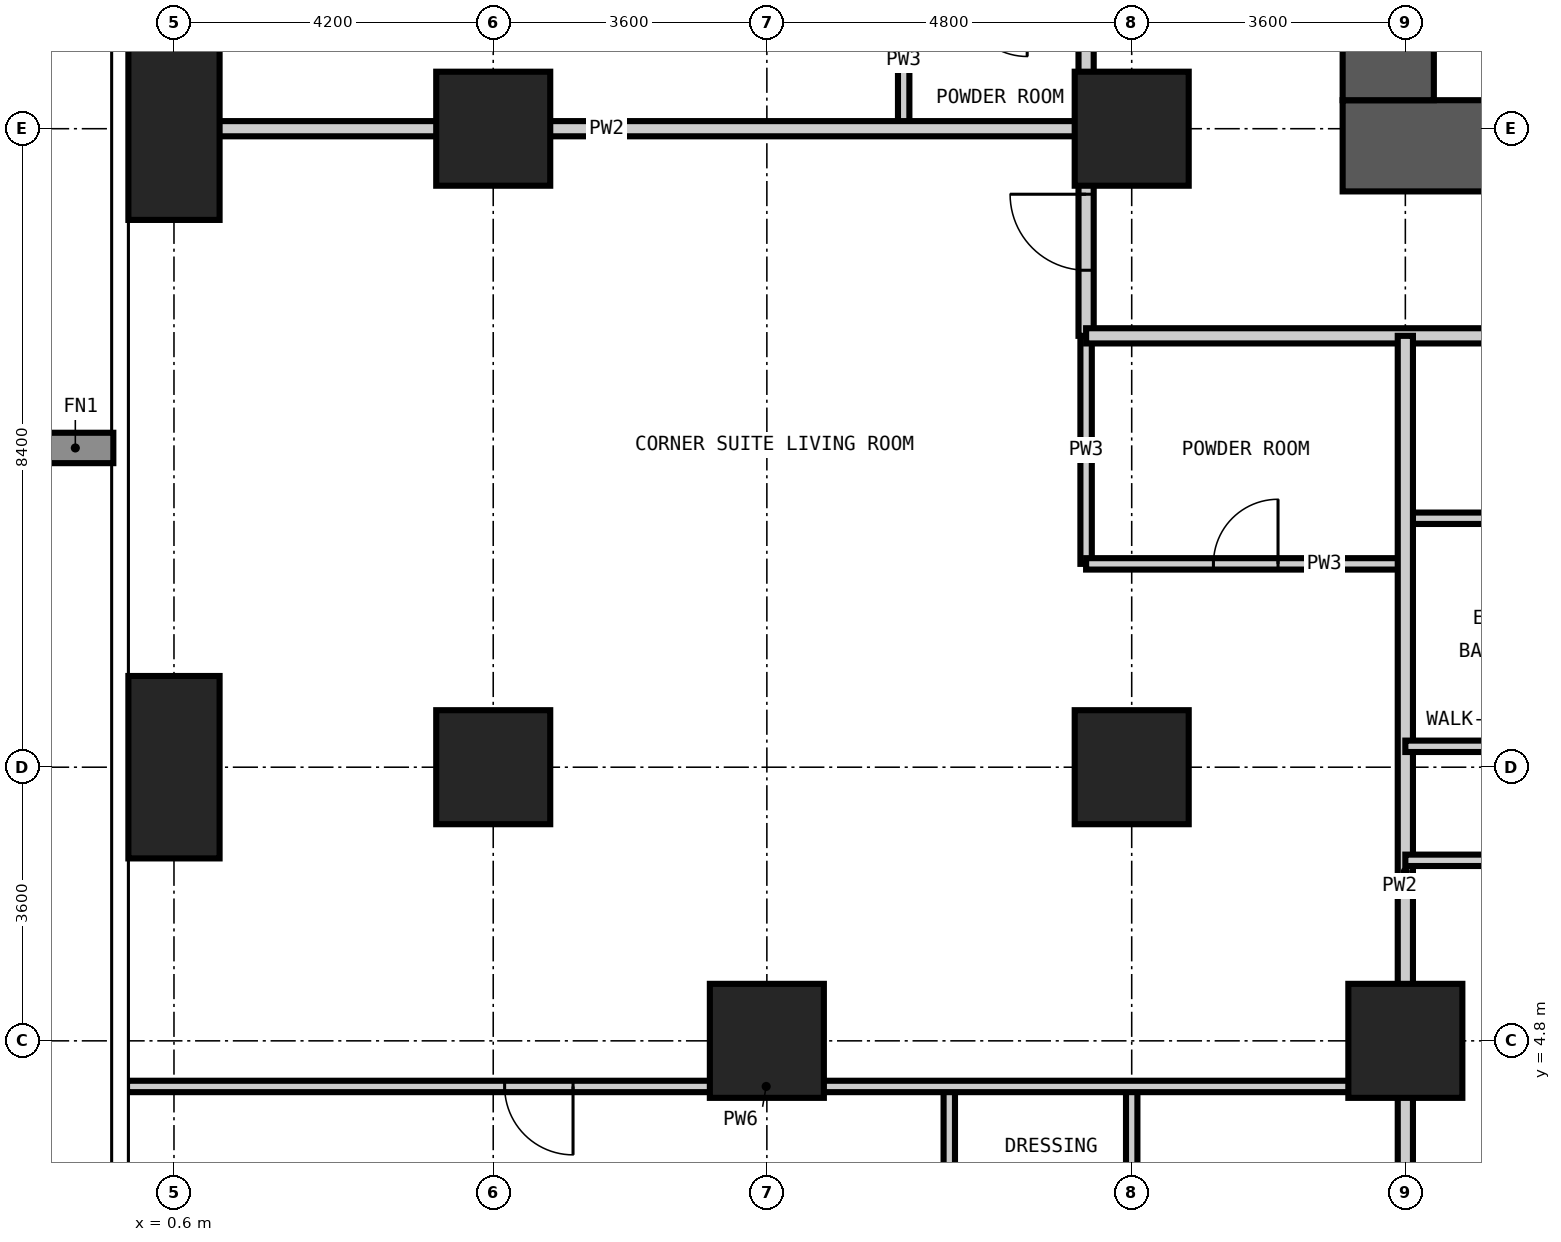
"""IFC4 building model, lengths in metres.
Left out: names, types, materials, properties, quantities, classifications, styles, units other than length and angle.
Written with IfcOpenShell. Run it as: python <this file> out.ifc"""

import sys

from ifc_helpers import new_model, si_unit, direction, frame, frame_2d, origin, origin_2d, place, context, subcontext, project, spatial, rectangle, extrude, element, fill, save


model = new_model("IFC4")
c1 = context("Model", 3, precision=1e-05, world=origin(), true_north=direction((0.0, 1.0)))
c2 = subcontext(c1, "Body", "Model", "MODEL_VIEW")
j1 = project(units=[si_unit("LENGTHUNIT", "METRE"), si_unit("PLANEANGLEUNIT", "RADIAN")], contexts=[c1])
p1 = place(None, origin())
s1 = spatial("IfcSite", under=j1, at=p1, CompositionType="ELEMENT")
p2 = place(p1, origin())
s2 = spatial("IfcBuilding", under=s1, at=p2, CompositionType="ELEMENT")
p3 = place(p2, frame((0.0, 0.0, 100.8)))
s3 = spatial("IfcBuildingStorey", under=s2, at=p3, CompositionType="ELEMENT", Elevation=100.8)
for number, where, z_axis, x_axis in (
    (1, (0.6, 8.4, -0.35), (0.0, 0.0, 1.0), (1.0, 0.0, 0.0)),
    (2, (0.6, 16.8, -0.35), (0.0, 0.0, 1.0), (1.0, 0.0, 0.0)),
):
    element("IfcColumn", number, at=place(p3, frame(where, z_axis=z_axis, x_axis=x_axis)), inside=s3, PredefinedType="COLUMN", context=c2, shape_type="SweptSolid", body=[
        extrude(rectangle(XDim=1.2, YDim=2.4, at=origin_2d()), origin(), (0.0, 0.0, 1.0), 3.6),
    ])
for number, where, z_axis, x_axis in (
    (3, (4.8, 8.4, -0.35), (0.0, 0.0, 1.0), (1.0, 0.0, 0.0)),
    (4, (4.8, 16.8, -0.35), (0.0, 0.0, 1.0), (1.0, 0.0, 0.0)),
    (5, (8.4, 4.8, -0.35), (0.0, 0.0, 1.0), (1.0, 0.0, 0.0)),
    (6, (13.2, 8.4, -0.35), (0.0, 0.0, 1.0), (1.0, 0.0, 0.0)),
    (7, (13.2, 16.8, -0.35), (0.0, 0.0, 1.0), (1.0, 0.0, 0.0)),
    (8, (16.8, 4.8, -0.35), (0.0, 0.0, 1.0), (1.0, 0.0, 0.0)),
):
    element("IfcColumn", number, at=place(p3, frame(where, z_axis=z_axis, x_axis=x_axis)), inside=s3, PredefinedType="COLUMN", context=c2, shape_type="SweptSolid", body=[
        extrude(rectangle(XDim=1.5, YDim=1.5, at=origin_2d()), origin(), (0.0, 0.0, 1.0), 3.6),
    ])
p4 = place(p3, frame((15.975, 16.575, -0.35), z_axis=(0.0, 0.0, 1.0), x_axis=(1.0, 0.0, 0.0)))
e9 = element("IfcWall", 9, at=p4, inside=s3, PredefinedType="SHEAR", context=c2, shape_type="SweptSolid", body=[
    extrude(rectangle(XDim=26.85, YDim=1.2, at=frame_2d((13.425, 0.0))), origin(), (0.0, 0.0, 1.0), 3.6),
])
p5 = place(p4, frame((12.925, 0.0, 0.35)))
e10 = element("IfcOpeningElement", 10, at=p5, cuts=e9, PredefinedType="OPENING", context=c2, shape_type="SweptSolid", body=[
    extrude(rectangle(XDim=1.0, YDim=2.1, at=frame_2d((0.5, 1.05))), frame((0.0, 0.61, 0.0), z_axis=(0.0, -1.0, 0.0), x_axis=(1.0, 0.0, 0.0)), (0.0, 0.0, 1.0), 1.22),
])
p6 = place(p4, frame((19.225, 0.0, 0.35)))
e11 = element("IfcOpeningElement", 11, at=p6, cuts=e9, PredefinedType="OPENING", context=c2, shape_type="SweptSolid", body=[
    extrude(rectangle(XDim=1.0, YDim=2.1, at=frame_2d((0.5, 1.05))), frame((0.0, 0.61, 0.0), z_axis=(0.0, -1.0, 0.0), x_axis=(1.0, 0.0, 0.0)), (0.0, 0.0, 1.0), 1.22),
])
p7 = place(p3, frame((16.575, 41.625, -0.35), z_axis=(0.0, 0.0, 1.0), x_axis=(0.0, -1.0, 0.0)))
e12 = element("IfcWall", 12, at=p7, inside=s3, PredefinedType="SHEAR", context=c2, shape_type="SweptSolid", body=[
    extrude(rectangle(XDim=24.45, YDim=1.2, at=frame_2d((12.225, 0.0))), origin(), (0.0, 0.0, 1.0), 3.6),
])
p8 = place(p7, frame((11.325, 0.0, 0.35)))
e13 = element("IfcOpeningElement", 13, at=p8, cuts=e12, PredefinedType="OPENING", context=c2, shape_type="SweptSolid", body=[
    extrude(rectangle(XDim=1.8, YDim=2.2, at=frame_2d((0.9, 1.1))), frame((0.0, 0.61, 0.0), z_axis=(0.0, -1.0, 0.0), x_axis=(1.0, 0.0, 0.0)), (0.0, 0.0, 1.0), 1.22),
])
p9 = place(p7, frame((20.125, 0.0, 0.35)))
e14 = element("IfcOpeningElement", 14, at=p9, cuts=e12, PredefinedType="OPENING", context=c2, shape_type="SweptSolid", body=[
    extrude(rectangle(XDim=1.0, YDim=2.1, at=frame_2d((0.5, 1.05))), frame((0.0, 0.61, 0.0), z_axis=(0.0, -1.0, 0.0), x_axis=(1.0, 0.0, 0.0)), (0.0, 0.0, 1.0), 1.22),
])
p10 = place(p7, frame((5.425, 0.0, 0.35)))
e15 = element("IfcOpeningElement", 15, at=p10, cuts=e12, PredefinedType="OPENING", context=c2, shape_type="SweptSolid", body=[
    extrude(rectangle(XDim=1.0, YDim=2.1, at=frame_2d((0.5, 1.05))), frame((0.0, 0.61, 0.0), z_axis=(0.0, -1.0, 0.0), x_axis=(1.0, 0.0, 0.0)), (0.0, 0.0, 1.0), 1.22),
])
p11 = place(p3, frame((10.2, 16.8, 0.0), z_axis=(0.0, 0.0, 1.0), x_axis=(0.0, 1.0, 0.0)))
e16 = element("IfcWall", 16, at=p11, inside=s3, PredefinedType="PARTITIONING", context=c2, shape_type="SweptSolid", body=[
    extrude(rectangle(XDim=1.8, YDim=0.15, at=frame_2d((0.9, 0.0))), origin(), (0.0, 0.0, 1.0), 3.25),
])
p12 = place(p3, frame((12.6, 11.075, 0.0), z_axis=(0.0, 0.0, 1.0), x_axis=(0.0, 1.0, 0.0)))
e17 = element("IfcWall", 17, at=p12, inside=s3, PredefinedType="PARTITIONING", context=c2, shape_type="SweptSolid", body=[
    extrude(rectangle(XDim=3.0, YDim=0.15, at=frame_2d((1.5, 0.0))), origin(), (0.0, 0.0, 1.0), 3.25),
])
p13 = place(p3, frame((12.6, 11.075, 0.0), z_axis=(0.0, 0.0, 1.0), x_axis=(1.0, 0.0, 0.0)))
e18 = element("IfcWall", 18, at=p13, inside=s3, PredefinedType="PARTITIONING", context=c2, shape_type="SweptSolid", body=[
    extrude(rectangle(XDim=4.2, YDim=0.15, at=frame_2d((2.1, 0.0))), origin(), (0.0, 0.0, 1.0), 3.25),
])
p14 = place(p13, frame((1.675, 0.0, 0.0)))
e19 = element("IfcOpeningElement", 19, at=p14, cuts=e18, PredefinedType="OPENING", context=c2, shape_type="SweptSolid", body=[
    extrude(rectangle(XDim=0.85, YDim=2.1, at=frame_2d((0.425, 1.05))), frame((0.0, 0.085, 0.0), z_axis=(0.0, -1.0, 0.0), x_axis=(1.0, 0.0, 0.0)), (0.0, 0.0, 1.0), 0.17),
])
p15 = place(p3, frame((16.8, 11.675, 0.0), z_axis=(0.0, 0.0, 1.0), x_axis=(1.0, 0.0, 0.0)))
e20 = element("IfcWall", 20, at=p15, inside=s3, PredefinedType="PARTITIONING", context=c2, shape_type="SweptSolid", body=[
    extrude(rectangle(XDim=3.0, YDim=0.15, at=frame_2d((1.5, 0.0))), origin(), (0.0, 0.0, 1.0), 3.25),
])
p16 = place(p3, frame((12.6, 14.075, 0.0), z_axis=(0.0, 0.0, 1.0), x_axis=(0.0, 1.0, 0.0)))
e21 = element("IfcWall", 21, at=p16, inside=s3, PredefinedType="PARTITIONING", context=c2, shape_type="SweptSolid", body=[
    extrude(rectangle(XDim=31.25, YDim=0.2, at=frame_2d((15.625, 0.0))), origin(), (0.0, 0.0, 1.0), 3.25),
])
p17 = place(p16, frame((5.225, 0.0, 0.0)))
e22 = element("IfcOpeningElement", 22, at=p17, cuts=e21, PredefinedType="OPENING", context=c2, shape_type="SweptSolid", body=[
    extrude(rectangle(XDim=1.0, YDim=2.2, at=frame_2d((0.5, 1.1))), frame((0.0, 0.11, 0.0), z_axis=(0.0, -1.0, 0.0), x_axis=(1.0, 0.0, 0.0)), (0.0, 0.0, 1.0), 0.22),
])
p18 = place(p16, frame((13.625, 0.0, 0.0)))
e23 = element("IfcOpeningElement", 23, at=p18, cuts=e21, PredefinedType="OPENING", context=c2, shape_type="SweptSolid", body=[
    extrude(rectangle(XDim=1.0, YDim=2.2, at=frame_2d((0.5, 1.1))), frame((0.0, 0.11, 0.0), z_axis=(0.0, -1.0, 0.0), x_axis=(1.0, 0.0, 0.0)), (0.0, 0.0, 1.0), 0.22),
])
p19 = place(p16, frame((22.025, 0.0, 0.0)))
e24 = element("IfcOpeningElement", 24, at=p19, cuts=e21, PredefinedType="OPENING", context=c2, shape_type="SweptSolid", body=[
    extrude(rectangle(XDim=1.0, YDim=2.2, at=frame_2d((0.5, 1.1))), frame((0.0, 0.11, 0.0), z_axis=(0.0, -1.0, 0.0), x_axis=(1.0, 0.0, 0.0)), (0.0, 0.0, 1.0), 0.22),
])
p20 = place(p16, frame((0.863, 0.0, 0.0)))
e25 = element("IfcOpeningElement", 25, at=p20, cuts=e21, PredefinedType="OPENING", context=c2, shape_type="SweptSolid", body=[
    extrude(rectangle(XDim=1.0, YDim=2.2, at=frame_2d((0.5, 1.1))), frame((0.0, 0.11, 0.0), z_axis=(0.0, -1.0, 0.0), x_axis=(1.0, 0.0, 0.0)), (0.0, 0.0, 1.0), 0.22),
])
p21 = place(p16, frame((29.088, 0.0, 0.0)))
e26 = element("IfcOpeningElement", 26, at=p21, cuts=e21, PredefinedType="OPENING", context=c2, shape_type="SweptSolid", body=[
    extrude(rectangle(XDim=1.0, YDim=2.2, at=frame_2d((0.5, 1.1))), frame((0.0, 0.11, 0.0), z_axis=(0.0, -1.0, 0.0), x_axis=(1.0, 0.0, 0.0)), (0.0, 0.0, 1.0), 0.22),
])
p22 = place(p3, frame((45.925, 14.075, 0.0), z_axis=(0.0, 0.0, 1.0), x_axis=(-1.0, 0.0, 0.0)))
e27 = element("IfcWall", 27, at=p22, inside=s3, PredefinedType="PARTITIONING", context=c2, shape_type="SweptSolid", body=[
    extrude(rectangle(XDim=33.325, YDim=0.2, at=frame_2d((16.663, 0.0))), origin(), (0.0, 0.0, 1.0), 3.25),
])
p23 = place(p22, frame((26.525, 0.0, 0.0)))
e28 = element("IfcOpeningElement", 28, at=p23, cuts=e27, PredefinedType="OPENING", context=c2, shape_type="SweptSolid", body=[
    extrude(rectangle(XDim=1.0, YDim=2.2, at=frame_2d((0.5, 1.1))), frame((0.0, 0.11, 0.0), z_axis=(0.0, -1.0, 0.0), x_axis=(1.0, 0.0, 0.0)), (0.0, 0.0, 1.0), 0.22),
])
p24 = place(p22, frame((20.225, 0.0, 0.0)))
e29 = element("IfcOpeningElement", 29, at=p24, cuts=e27, PredefinedType="OPENING", context=c2, shape_type="SweptSolid", body=[
    extrude(rectangle(XDim=1.0, YDim=2.2, at=frame_2d((0.5, 1.1))), frame((0.0, 0.11, 0.0), z_axis=(0.0, -1.0, 0.0), x_axis=(1.0, 0.0, 0.0)), (0.0, 0.0, 1.0), 0.22),
])
p25 = place(p22, frame((11.825, 0.0, 0.0)))
e30 = element("IfcOpeningElement", 30, at=p25, cuts=e27, PredefinedType="OPENING", context=c2, shape_type="SweptSolid", body=[
    extrude(rectangle(XDim=1.0, YDim=2.2, at=frame_2d((0.5, 1.1))), frame((0.0, 0.11, 0.0), z_axis=(0.0, -1.0, 0.0), x_axis=(1.0, 0.0, 0.0)), (0.0, 0.0, 1.0), 0.22),
])
p26 = place(p22, frame((5.525, 0.0, 0.0)))
e31 = element("IfcOpeningElement", 31, at=p26, cuts=e27, PredefinedType="OPENING", context=c2, shape_type="SweptSolid", body=[
    extrude(rectangle(XDim=1.0, YDim=2.2, at=frame_2d((0.5, 1.1))), frame((0.0, 0.11, 0.0), z_axis=(0.0, -1.0, 0.0), x_axis=(1.0, 0.0, 0.0)), (0.0, 0.0, 1.0), 0.22),
])
p27 = place(p3, frame((16.8, -0.018, 0.0), z_axis=(0.0, 0.0, 1.0), x_axis=(0.0, 1.0, 0.0)))
e32 = element("IfcWall", 32, at=p27, inside=s3, PredefinedType="PARTITIONING", context=c2, shape_type="SweptSolid", body=[
    extrude(rectangle(XDim=14.093, YDim=0.2, at=frame_2d((7.046, 0.0))), origin(), (0.0, 0.0, 1.0), 3.25),
])
p28 = place(p3, frame((-0.018, 16.8, 0.0), z_axis=(0.0, 0.0, 1.0), x_axis=(1.0, 0.0, 0.0)))
e33 = element("IfcWall", 33, at=p28, inside=s3, PredefinedType="PARTITIONING", context=c2, shape_type="SweptSolid", body=[
    extrude(rectangle(XDim=12.618, YDim=0.2, at=frame_2d((6.309, 0.0))), origin(), (0.0, 0.0, 1.0), 3.25),
])
p29 = place(p3, frame((10.8, 1.2, 0.0), z_axis=(0.0, 0.0, 1.0), x_axis=(0.0, 1.0, 0.0)))
e34 = element("IfcWall", 34, at=p29, inside=s3, PredefinedType="PARTITIONING", context=c2, shape_type="SweptSolid", body=[
    extrude(rectangle(XDim=3.0, YDim=0.15, at=frame_2d((1.5, 0.0))), origin(), (0.0, 0.0, 1.0), 3.25),
])
p30 = place(p29, frame((1.05, 0.0, 0.0)))
e35 = element("IfcOpeningElement", 35, at=p30, cuts=e34, PredefinedType="OPENING", context=c2, shape_type="SweptSolid", body=[
    extrude(rectangle(XDim=0.9, YDim=2.1, at=frame_2d((0.45, 1.05))), frame((0.0, 0.085, 0.0), z_axis=(0.0, -1.0, 0.0), x_axis=(1.0, 0.0, 0.0)), (0.0, 0.0, 1.0), 0.17),
])
p31 = place(p3, frame((13.2, 1.2, 0.0), z_axis=(0.0, 0.0, 1.0), x_axis=(0.0, 1.0, 0.0)))
e36 = element("IfcWall", 36, at=p31, inside=s3, PredefinedType="PARTITIONING", context=c2, shape_type="SweptSolid", body=[
    extrude(rectangle(XDim=3.0, YDim=0.15, at=frame_2d((1.5, 0.0))), origin(), (0.0, 0.0, 1.0), 3.25),
])
p32 = place(p3, frame((-0.018, 4.2, 0.0), z_axis=(0.0, 0.0, 1.0), x_axis=(1.0, 0.0, 0.0)))
e37 = element("IfcWall", 37, at=p32, inside=s3, PredefinedType="PARTITIONING", context=c2, shape_type="SweptSolid", body=[
    extrude(rectangle(XDim=16.818, YDim=0.15, at=frame_2d((8.409, 0.0))), origin(), (0.0, 0.0, 1.0), 3.25),
])
p33 = place(p32, frame((4.968, 0.0, 0.0)))
e38 = element("IfcOpeningElement", 38, at=p33, cuts=e37, PredefinedType="OPENING", context=c2, shape_type="SweptSolid", body=[
    extrude(rectangle(XDim=0.9, YDim=2.1, at=frame_2d((0.45, 1.05))), frame((0.0, 0.085, 0.0), z_axis=(0.0, -1.0, 0.0), x_axis=(1.0, 0.0, 0.0)), (0.0, 0.0, 1.0), 0.17),
])
p34 = place(p3, frame((16.8, 7.175, 0.0), z_axis=(0.0, 0.0, 1.0), x_axis=(1.0, 0.0, 0.0)))
e39 = element("IfcWall", 39, at=p34, inside=s3, PredefinedType="PARTITIONING", context=c2, shape_type="SweptSolid", body=[
    extrude(rectangle(XDim=3.0, YDim=0.15, at=frame_2d((1.5, 0.0))), origin(), (0.0, 0.0, 1.0), 3.25),
])
p35 = place(p34, frame((1.05, 0.0, 0.0)))
e40 = element("IfcOpeningElement", 40, at=p35, cuts=e39, PredefinedType="OPENING", context=c2, shape_type="SweptSolid", body=[
    extrude(rectangle(XDim=0.9, YDim=2.1, at=frame_2d((0.45, 1.05))), frame((0.0, 0.085, 0.0), z_axis=(0.0, -1.0, 0.0), x_axis=(1.0, 0.0, 0.0)), (0.0, 0.0, 1.0), 0.17),
])
p36 = place(p3, frame((16.8, 8.675, 0.0), z_axis=(0.0, 0.0, 1.0), x_axis=(1.0, 0.0, 0.0)))
e41 = element("IfcWall", 41, at=p36, inside=s3, PredefinedType="PARTITIONING", context=c2, shape_type="SweptSolid", body=[
    extrude(rectangle(XDim=3.0, YDim=0.15, at=frame_2d((1.5, 0.0))), origin(), (0.0, 0.0, 1.0), 3.25),
])
p37 = place(p20, origin())
e42 = element("IfcDoor", 42, at=p37, inside=s3, OperationType="SINGLE_SWING_RIGHT", PredefinedType="DOOR", context=c2, shape_type="SweptSolid", body=[
    extrude(rectangle(XDim=1.0, YDim=2.2, at=frame_2d((0.5, 1.1))), frame((0.0, 0.025, 0.0), z_axis=(0.0, -1.0, 0.0), x_axis=(1.0, 0.0, 0.0)), (0.0, 0.0, 1.0), 0.05),
])
fill(e25, e42)
p38 = place(p14, origin())
e43 = element("IfcDoor", 43, at=p38, inside=s3, OperationType="SINGLE_SWING_RIGHT", PredefinedType="DOOR", context=c2, shape_type="SweptSolid", body=[
    extrude(rectangle(XDim=0.85, YDim=2.1, at=frame_2d((0.425, 1.05))), frame((0.0, 0.025, 0.0), z_axis=(0.0, -1.0, 0.0), x_axis=(1.0, 0.0, 0.0)), (0.0, 0.0, 1.0), 0.05),
])
fill(e19, e43)
p39 = place(p33, frame((0.9, 0.0, 0.0), z_axis=(0.0, 0.0, 1.0), x_axis=(-1.0, 0.0, 0.0)))
e44 = element("IfcDoor", 44, at=p39, inside=s3, OperationType="SINGLE_SWING_LEFT", PredefinedType="DOOR", context=c2, shape_type="SweptSolid", body=[
    extrude(rectangle(XDim=0.9, YDim=2.1, at=frame_2d((0.45, 1.05))), frame((0.0, 0.025, 0.0), z_axis=(0.0, -1.0, 0.0), x_axis=(1.0, 0.0, 0.0)), (0.0, 0.0, 1.0), 0.05),
])
fill(e38, e44)
save(model, sys.argv[1])
